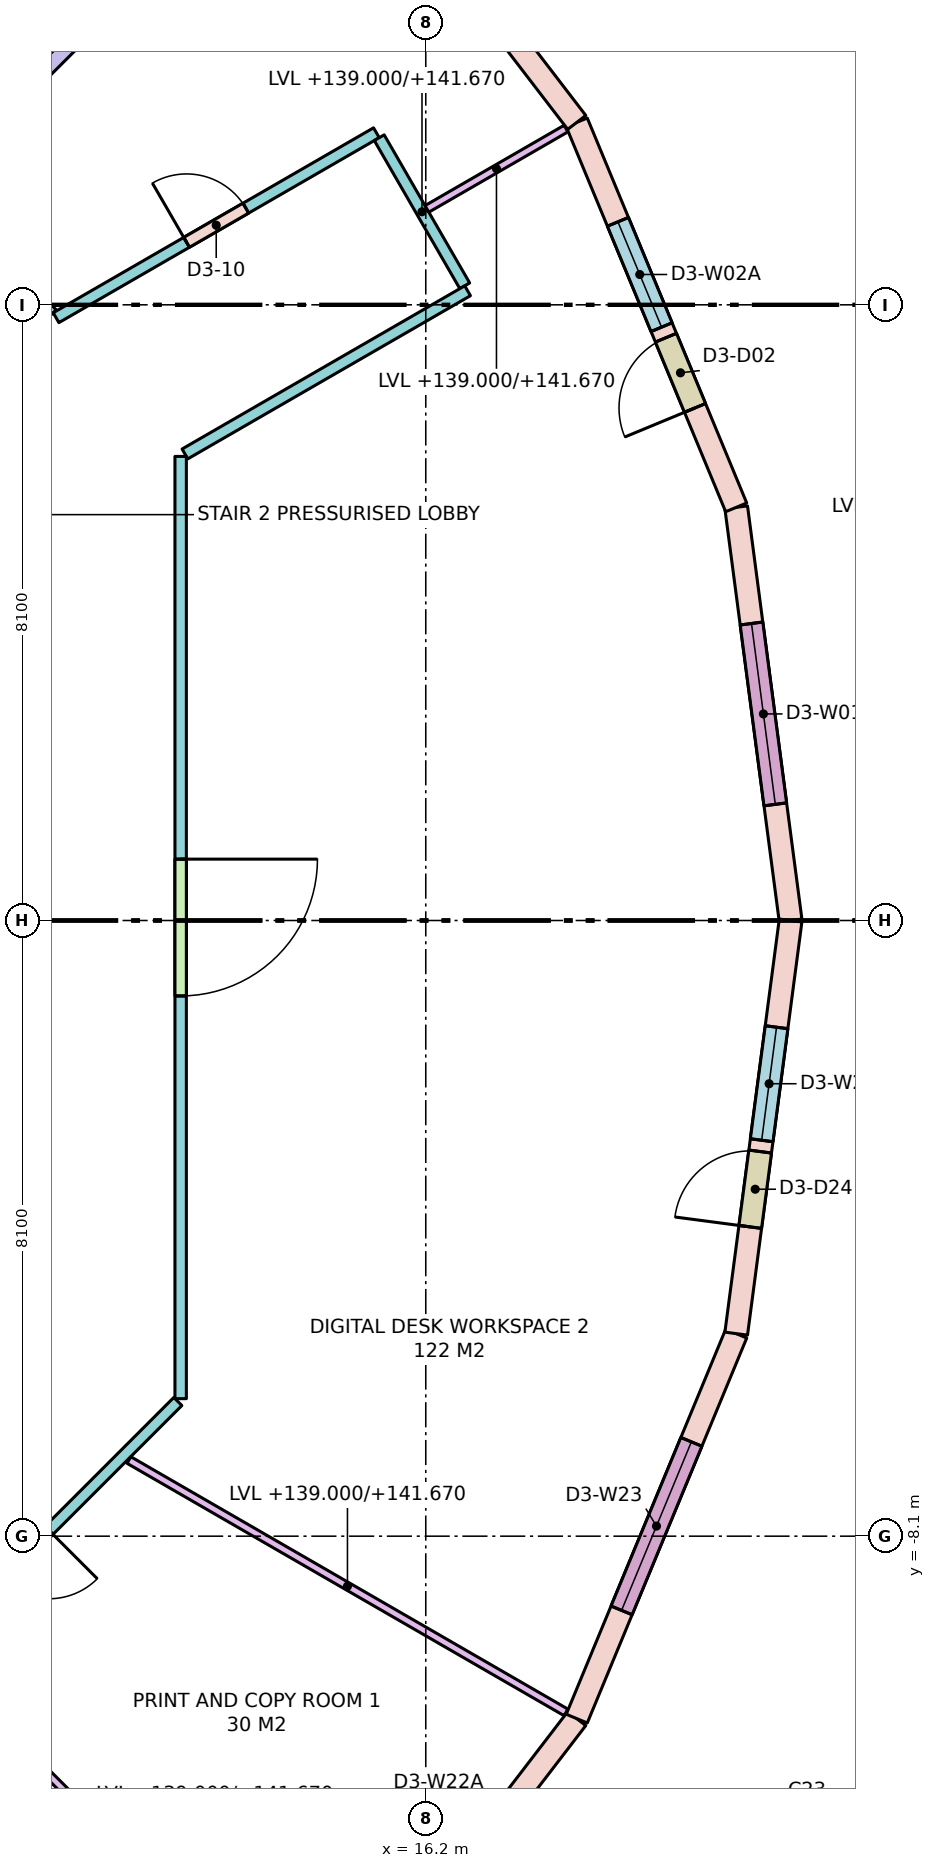
"""IFC4 building model, lengths in metres.
Left out: names, types, materials, properties, quantities, classifications, styles, units other than length and angle.
Written with IfcOpenShell. Run it as: python <this file> out.ifc"""

import sys

from ifc_helpers import new_model, si_unit, direction, frame, frame_2d, origin, place, context, subcontext, project, spatial, rectangle, extrude, element, fill, save


model = new_model("IFC4")
c1 = context("Model", 3, precision=1e-05, world=origin(), true_north=direction((0.0, 1.0)))
c2 = subcontext(c1, "Body", "Model", "MODEL_VIEW")
j1 = project(units=[si_unit("LENGTHUNIT", "METRE"), si_unit("PLANEANGLEUNIT", "RADIAN")], contexts=[c1])
p1 = place(None, origin())
s1 = spatial("IfcSite", under=j1, at=p1, CompositionType="ELEMENT")
p2 = place(p1, origin())
s2 = spatial("IfcBuilding", under=s1, at=p2, CompositionType="ELEMENT")
p3 = place(p2, frame((0.0, 0.0, 139.0)))
s3 = spatial("IfcBuildingStorey", under=s2, at=p3, CompositionType="ELEMENT", Elevation=139.0)
p4 = place(p3, frame((21.0, 0.0, 0.0), z_axis=(0.0, 0.0, 1.0), x_axis=(-0.130527087244, 0.991444743541, 0.0)))
e1 = element("IfcWall", 1, at=p4, inside=s3, PredefinedType="STANDARD", context=c2, shape_type="SweptSolid", body=[
    extrude(rectangle(XDim=5.482, YDim=0.3, at=frame_2d((2.741, 0.0))), origin(), (0.0, 0.0, 1.0), 3.52),
])
p5 = place(p4, frame((1.541, 0.0, 0.8)))
e2 = element("IfcOpeningElement", 2, at=p5, cuts=e1, PredefinedType="OPENING", context=c2, shape_type="SweptSolid", body=[
    extrude(rectangle(XDim=2.4, YDim=2.5, at=frame_2d((1.2, 1.25))), frame((0.0, 0.16, 0.0), z_axis=(0.0, -1.0, 0.0), x_axis=(1.0, 0.0, 0.0)), (0.0, 0.0, 1.0), 0.32),
])
p6 = place(p3, frame((20.284, 5.435, 0.0), z_axis=(0.0, 0.0, 1.0), x_axis=(-0.382688740813, 0.923877333662, 0.0)))
e3 = element("IfcWall", 3, at=p6, inside=s3, PredefinedType="STANDARD", context=c2, shape_type="SweptSolid", body=[
    extrude(rectangle(XDim=5.482, YDim=0.3, at=frame_2d((2.741, 0.0))), origin(), (0.0, 0.0, 1.0), 3.52),
])
p7 = place(p6, frame((1.416, 0.0, 0.0)))
e4 = element("IfcOpeningElement", 4, at=p7, cuts=e3, PredefinedType="OPENING", context=c2, shape_type="SweptSolid", body=[
    extrude(rectangle(XDim=1.0, YDim=2.4, at=frame_2d((0.5, 1.2))), frame((0.0, 0.16, 0.0), z_axis=(0.0, -1.0, 0.0), x_axis=(1.0, 0.0, 0.0)), (0.0, 0.0, 1.0), 0.32),
])
p8 = place(p6, frame((2.566, 0.0, 0.8)))
e5 = element("IfcOpeningElement", 5, at=p8, cuts=e3, PredefinedType="OPENING", context=c2, shape_type="SweptSolid", body=[
    extrude(rectangle(XDim=1.5, YDim=2.5, at=frame_2d((0.75, 1.25))), frame((0.0, 0.16, 0.0), z_axis=(0.0, -1.0, 0.0), x_axis=(1.0, 0.0, 0.0)), (0.0, 0.0, 1.0), 0.32),
])
p9 = place(p3, frame((18.187, 10.5, 0.0), z_axis=(0.0, 0.0, 1.0), x_axis=(-0.608784891166, 0.793335336593, 0.0)))
e6 = element("IfcWall", 6, at=p9, inside=s3, PredefinedType="STANDARD", context=c2, shape_type="SweptSolid", body=[
    extrude(rectangle(XDim=5.482, YDim=0.3, at=frame_2d((2.741, 0.0))), origin(), (0.0, 0.0, 1.0), 3.52),
])
p10 = place(p9, frame((1.541, 0.0, 0.8)))
e7 = element("IfcOpeningElement", 7, at=p10, cuts=e6, PredefinedType="OPENING", context=c2, shape_type="SweptSolid", body=[
    extrude(rectangle(XDim=2.4, YDim=2.5, at=frame_2d((1.2, 1.25))), frame((0.0, 0.16, 0.0), z_axis=(0.0, -1.0, 0.0), x_axis=(1.0, 0.0, 0.0)), (0.0, 0.0, 1.0), 0.32),
])
p11 = place(p3, frame((14.849, -14.849, 0.0), z_axis=(0.0, 0.0, 1.0), x_axis=(0.608784891166, 0.793335336593, 0.0)))
e8 = element("IfcWall", 8, at=p11, inside=s3, PredefinedType="STANDARD", context=c2, shape_type="SweptSolid", body=[
    extrude(rectangle(XDim=5.482, YDim=0.3, at=frame_2d((2.741, 0.0))), origin(), (0.0, 0.0, 1.0), 3.52),
])
p12 = place(p11, frame((1.416, 0.0, 0.0)))
e9 = element("IfcOpeningElement", 9, at=p12, cuts=e8, PredefinedType="OPENING", context=c2, shape_type="SweptSolid", body=[
    extrude(rectangle(XDim=1.0, YDim=2.4, at=frame_2d((0.5, 1.2))), frame((0.0, 0.16, 0.0), z_axis=(0.0, -1.0, 0.0), x_axis=(1.0, 0.0, 0.0)), (0.0, 0.0, 1.0), 0.32),
])
p13 = place(p11, frame((2.566, 0.0, 0.8)))
e10 = element("IfcOpeningElement", 10, at=p13, cuts=e8, PredefinedType="OPENING", context=c2, shape_type="SweptSolid", body=[
    extrude(rectangle(XDim=1.5, YDim=2.5, at=frame_2d((0.75, 1.25))), frame((0.0, 0.16, 0.0), z_axis=(0.0, -1.0, 0.0), x_axis=(1.0, 0.0, 0.0)), (0.0, 0.0, 1.0), 0.32),
])
p14 = place(p3, frame((18.187, -10.5, 0.0), z_axis=(0.0, 0.0, 1.0), x_axis=(0.382688740813, 0.923877333662, 0.0)))
e11 = element("IfcWall", 11, at=p14, inside=s3, PredefinedType="STANDARD", context=c2, shape_type="SweptSolid", body=[
    extrude(rectangle(XDim=5.482, YDim=0.3, at=frame_2d((2.741, 0.0))), origin(), (0.0, 0.0, 1.0), 3.52),
])
p15 = place(p14, frame((1.541, 0.0, 0.8)))
e12 = element("IfcOpeningElement", 12, at=p15, cuts=e11, PredefinedType="OPENING", context=c2, shape_type="SweptSolid", body=[
    extrude(rectangle(XDim=2.4, YDim=2.5, at=frame_2d((1.2, 1.25))), frame((0.0, 0.16, 0.0), z_axis=(0.0, -1.0, 0.0), x_axis=(1.0, 0.0, 0.0)), (0.0, 0.0, 1.0), 0.32),
])
p16 = place(p3, frame((20.284, -5.435, 0.0), z_axis=(0.0, 0.0, 1.0), x_axis=(0.130527087244, 0.991444743541, 0.0)))
e13 = element("IfcWall", 13, at=p16, inside=s3, PredefinedType="STANDARD", context=c2, shape_type="SweptSolid", body=[
    extrude(rectangle(XDim=5.482, YDim=0.3, at=frame_2d((2.741, 0.0))), origin(), (0.0, 0.0, 1.0), 3.52),
])
p17 = place(p16, frame((1.416, 0.0, 0.0)))
e14 = element("IfcOpeningElement", 14, at=p17, cuts=e13, PredefinedType="OPENING", context=c2, shape_type="SweptSolid", body=[
    extrude(rectangle(XDim=1.0, YDim=2.4, at=frame_2d((0.5, 1.2))), frame((0.0, 0.16, 0.0), z_axis=(0.0, -1.0, 0.0), x_axis=(1.0, 0.0, 0.0)), (0.0, 0.0, 1.0), 0.32),
])
p18 = place(p16, frame((2.566, 0.0, 0.8)))
e15 = element("IfcOpeningElement", 15, at=p18, cuts=e13, PredefinedType="OPENING", context=c2, shape_type="SweptSolid", body=[
    extrude(rectangle(XDim=1.5, YDim=2.5, at=frame_2d((0.75, 1.25))), frame((0.0, 0.16, 0.0), z_axis=(0.0, -1.0, 0.0), x_axis=(1.0, 0.0, 0.0)), (0.0, 0.0, 1.0), 0.32),
])
p19 = place(p3, frame((9.633, 9.633, 0.0), z_axis=(0.0, 0.0, 1.0), x_axis=(0.707106781187, -0.707106781187, 0.0)))
e16 = element("IfcWall", 16, at=p19, inside=s3, PredefinedType="PARTITIONING", context=c2, shape_type="SweptSolid", body=[
    extrude(rectangle(XDim=2.335, YDim=0.15, at=frame_2d((1.168, 0.0))), origin(), (0.0, 0.0, 1.0), 2.67),
])
p20 = place(p3, frame((11.336, 7.93, 0.0), z_axis=(0.0, 0.0, 1.0), x_axis=(0.866042731792, 0.49996998581, 0.0)))
e17 = element("IfcWall", 17, at=p20, inside=s3, PredefinedType="PARTITIONING", context=c2, shape_type="SweptSolid", body=[
    extrude(rectangle(XDim=4.866, YDim=0.15, at=frame_2d((2.433, 0.0))), origin(), (0.0, 0.0, 1.0), 3.52),
])
p21 = place(p20, frame((1.983, 0.0, 0.0)))
e18 = element("IfcOpeningElement", 18, at=p21, cuts=e17, PredefinedType="OPENING", context=c2, shape_type="SweptSolid", body=[
    extrude(rectangle(XDim=0.9, YDim=2.1, at=frame_2d((0.45, 1.05))), frame((0.0, 0.085, 0.0), z_axis=(0.0, -1.0, 0.0), x_axis=(1.0, 0.0, 0.0)), (0.0, 0.0, 1.0), 0.17),
])
p22 = place(p3, frame((15.588, 10.299, 0.0), z_axis=(0.0, 0.0, 1.0), x_axis=(0.500013631625, -0.866017533419, 0.0)))
e19 = element("IfcWall", 19, at=p22, inside=s3, PredefinedType="PARTITIONING", context=c2, shape_type="SweptSolid", body=[
    extrude(rectangle(XDim=2.25, YDim=0.15, at=frame_2d((1.125, 0.0))), origin(), (0.0, 0.0, 1.0), 2.67),
])
p23 = place(p3, frame((16.75, 8.285, 0.0), z_axis=(0.0, 0.0, 1.0), x_axis=(-0.866019905438, -0.500009523294, 0.0)))
e20 = element("IfcWall", 20, at=p23, inside=s3, PredefinedType="PARTITIONING", context=c2, shape_type="SweptSolid", body=[
    extrude(rectangle(XDim=4.294, YDim=0.15, at=frame_2d((2.147, 0.0))), origin(), (0.0, 0.0, 1.0), 3.52),
])
p24 = place(p3, frame((12.975, 6.105, 0.0), z_axis=(0.0, 0.0, 1.0), x_axis=(0.0, -1.0, 0.0)))
e21 = element("IfcWall", 21, at=p24, inside=s3, PredefinedType="PARTITIONING", context=c2, shape_type="SweptSolid", body=[
    extrude(rectangle(XDim=12.396, YDim=0.15, at=frame_2d((6.198, 0.0))), origin(), (0.0, 0.0, 1.0), 2.67),
])
p25 = place(p24, frame((5.298, 0.0, 0.0)))
e22 = element("IfcOpeningElement", 22, at=p25, cuts=e21, PredefinedType="OPENING", context=c2, shape_type="SweptSolid", body=[
    extrude(rectangle(XDim=1.8, YDim=2.1, at=frame_2d((0.9, 1.05))), frame((0.0, 0.085, 0.0), z_axis=(0.0, -1.0, 0.0), x_axis=(1.0, 0.0, 0.0)), (0.0, 0.0, 1.0), 0.17),
])
p26 = place(p3, frame((12.938, -6.328, 0.0), z_axis=(0.0, 0.0, 1.0), x_axis=(-0.707088206597, -0.707125355289, 0.0)))
e23 = element("IfcWall", 23, at=p26, inside=s3, PredefinedType="PARTITIONING", context=c2, shape_type="SweptSolid", body=[
    extrude(rectangle(XDim=6.572, YDim=0.15, at=frame_2d((3.286, 0.0))), origin(), (0.0, 0.0, 1.0), 2.67),
])
p27 = place(p26, frame((2.398, 0.0, 0.0)))
e24 = element("IfcOpeningElement", 24, at=p27, cuts=e23, PredefinedType="OPENING", context=c2, shape_type="SweptSolid", body=[
    extrude(rectangle(XDim=0.9, YDim=2.1, at=frame_2d((0.45, 1.05))), frame((0.0, 0.085, 0.0), z_axis=(0.0, -1.0, 0.0), x_axis=(1.0, 0.0, 0.0)), (0.0, 0.0, 1.0), 0.17),
])
p28 = place(p3, frame((16.215, 9.362, 0.0), z_axis=(0.0, 0.0, 1.0), x_axis=(0.866016279763, 0.500015802937, 0.0)))
e25 = element("IfcWall", 25, at=p28, inside=s3, PredefinedType="PARTITIONING", context=c2, shape_type="SweptSolid", body=[
    extrude(rectangle(XDim=2.113, YDim=0.1, at=frame_2d((1.057, 0.0))), origin(), (0.0, 0.0, 1.0), 2.67),
])
p29 = place(p3, frame((9.704, 9.704, 0.0), z_axis=(0.0, 0.0, 1.0), x_axis=(0.707106781187, 0.707106781187, 0.0)))
e26 = element("IfcWall", 26, at=p29, inside=s3, PredefinedType="PARTITIONING", context=c2, shape_type="SweptSolid", body=[
    extrude(rectangle(XDim=7.114, YDim=0.2, at=frame_2d((3.557, 0.0))), origin(), (0.0, 0.0, 1.0), 2.67),
])
p30 = place(p3, frame((9.686, -9.686, 0.0), z_axis=(0.0, 0.0, 1.0), x_axis=(0.707106781187, -0.707106781187, 0.0)))
e27 = element("IfcWall", 27, at=p30, inside=s3, PredefinedType="PARTITIONING", context=c2, shape_type="SweptSolid", body=[
    extrude(rectangle(XDim=7.139, YDim=0.1, at=frame_2d((3.569, 0.0))), origin(), (0.0, 0.0, 1.0), 2.67),
])
p31 = place(p3, frame((12.294, -7.098, 0.0), z_axis=(0.0, 0.0, 1.0), x_axis=(0.866010486135, -0.500025837236, 0.0)))
e28 = element("IfcWall", 28, at=p31, inside=s3, PredefinedType="PARTITIONING", context=c2, shape_type="SweptSolid", body=[
    extrude(rectangle(XDim=6.641, YDim=0.1, at=frame_2d((3.32, 0.0))), origin(), (0.0, 0.0, 1.0), 2.67),
])
p32 = place(p5, origin())
e29 = element("IfcWindow", 29, at=p32, inside=s3, PartitioningType="SINGLE_PANEL", PredefinedType="WINDOW", context=c2, shape_type="SweptSolid", body=[
    extrude(rectangle(XDim=2.4, YDim=2.5, at=frame_2d((1.2, 1.25))), frame((0.0, 0.03, 0.0), z_axis=(0.0, -1.0, 0.0), x_axis=(1.0, 0.0, 0.0)), (0.0, 0.0, 1.0), 0.06),
])
fill(e2, e29)
p33 = place(p7, origin())
e30 = element("IfcDoor", 30, at=p33, inside=s3, OperationType="SINGLE_SWING_LEFT", PredefinedType="DOOR", context=c2, shape_type="SweptSolid", body=[
    extrude(rectangle(XDim=1.0, YDim=2.4, at=frame_2d((0.5, 1.2))), frame((0.0, 0.025, 0.0), z_axis=(0.0, -1.0, 0.0), x_axis=(1.0, 0.0, 0.0)), (0.0, 0.0, 1.0), 0.05),
])
fill(e4, e30)
p34 = place(p8, origin())
e31 = element("IfcWindow", 31, at=p34, inside=s3, PartitioningType="SINGLE_PANEL", PredefinedType="WINDOW", context=c2, shape_type="SweptSolid", body=[
    extrude(rectangle(XDim=1.5, YDim=2.5, at=frame_2d((0.75, 1.25))), frame((0.0, 0.03, 0.0), z_axis=(0.0, -1.0, 0.0), x_axis=(1.0, 0.0, 0.0)), (0.0, 0.0, 1.0), 0.06),
])
fill(e5, e31)
p35 = place(p15, origin())
e32 = element("IfcWindow", 32, at=p35, inside=s3, PartitioningType="SINGLE_PANEL", PredefinedType="WINDOW", context=c2, shape_type="SweptSolid", body=[
    extrude(rectangle(XDim=2.4, YDim=2.5, at=frame_2d((1.2, 1.25))), frame((0.0, 0.03, 0.0), z_axis=(0.0, -1.0, 0.0), x_axis=(1.0, 0.0, 0.0)), (0.0, 0.0, 1.0), 0.06),
])
fill(e12, e32)
p36 = place(p17, origin())
e33 = element("IfcDoor", 33, at=p36, inside=s3, OperationType="SINGLE_SWING_LEFT", PredefinedType="DOOR", context=c2, shape_type="SweptSolid", body=[
    extrude(rectangle(XDim=1.0, YDim=2.4, at=frame_2d((0.5, 1.2))), frame((0.0, 0.025, 0.0), z_axis=(0.0, -1.0, 0.0), x_axis=(1.0, 0.0, 0.0)), (0.0, 0.0, 1.0), 0.05),
])
fill(e14, e33)
p37 = place(p18, origin())
e34 = element("IfcWindow", 34, at=p37, inside=s3, PartitioningType="SINGLE_PANEL", PredefinedType="WINDOW", context=c2, shape_type="SweptSolid", body=[
    extrude(rectangle(XDim=1.5, YDim=2.5, at=frame_2d((0.75, 1.25))), frame((0.0, 0.03, 0.0), z_axis=(0.0, -1.0, 0.0), x_axis=(1.0, 0.0, 0.0)), (0.0, 0.0, 1.0), 0.06),
])
fill(e15, e34)
p38 = place(p25, origin())
e35 = element("IfcDoor", 35, at=p38, inside=s3, OperationType="DOUBLE_DOOR_SINGLE_SWING", PredefinedType="DOOR", context=c2, shape_type="SweptSolid", body=[
    extrude(rectangle(XDim=1.8, YDim=2.1, at=frame_2d((0.9, 1.05))), frame((0.0, 0.025, 0.0), z_axis=(0.0, -1.0, 0.0), x_axis=(1.0, 0.0, 0.0)), (0.0, 0.0, 1.0), 0.05),
])
fill(e22, e35)
p39 = place(p21, origin())
e36 = element("IfcDoor", 36, at=p39, inside=s3, OperationType="SINGLE_SWING_LEFT", PredefinedType="DOOR", context=c2, shape_type="SweptSolid", body=[
    extrude(rectangle(XDim=0.9, YDim=2.1, at=frame_2d((0.45, 1.05))), frame((0.0, 0.025, 0.0), z_axis=(0.0, -1.0, 0.0), x_axis=(1.0, 0.0, 0.0)), (0.0, 0.0, 1.0), 0.05),
])
fill(e18, e36)
save(model, sys.argv[1])
